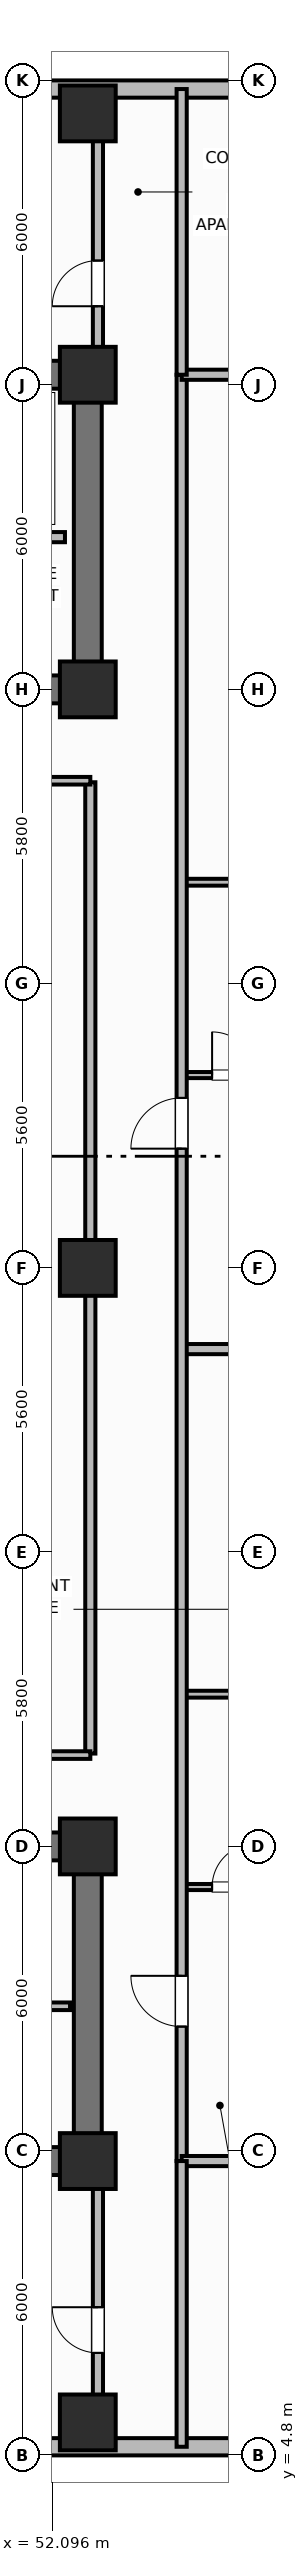
"""IFC4 building model, lengths in metres.
Left out: names, types, materials, properties, quantities, classifications, styles, units other than length and angle.
Written with IfcOpenShell. Run it as: python <this file> out.ifc"""

import sys

from ifc_helpers import new_model, si_unit, direction, frame, frame_2d, origin, origin_2d, place, context, subcontext, project, spatial, rectangle, extrude, element, fill, save


model = new_model("IFC4")
c1 = context("Model", 3, precision=1e-05, world=origin(), true_north=direction((0.0, 1.0)))
c2 = subcontext(c1, "Body", "Model", "MODEL_VIEW")
j1 = project(units=[si_unit("LENGTHUNIT", "METRE"), si_unit("PLANEANGLEUNIT", "RADIAN")], contexts=[c1])
p1 = place(None, origin())
s1 = spatial("IfcSite", under=j1, at=p1, CompositionType="ELEMENT")
p2 = place(p1, origin())
s2 = spatial("IfcBuilding", under=s1, at=p2, CompositionType="ELEMENT")
p3 = place(p2, frame((0.0, 0.0, 103.1)))
s3 = spatial("IfcBuildingStorey", under=s2, at=p3, CompositionType="ELEMENT", Elevation=103.1)
p4 = place(p3, frame((52.8, 10.6, 0.0), z_axis=(0.0, 0.0, 1.0), x_axis=(-1.0, 0.0, 0.0)))
e1 = element("IfcWall", 1, at=p4, inside=s3, PredefinedType="SHEAR", context=c2, shape_type="SweptSolid", body=[
    extrude(rectangle(XDim=27.2, YDim=0.55, at=frame_2d((13.6, 0.0))), origin(), (0.0, 0.0, 1.0), 3.7),
])
p5 = place(p3, frame((52.8, 10.875, 0.0), z_axis=(0.0, 0.0, 1.0), x_axis=(0.0, 1.0, 0.0)))
e2 = element("IfcWall", 2, at=p5, inside=s3, PredefinedType="SHEAR", context=c2, shape_type="SweptSolid", body=[
    extrude(rectangle(XDim=5.65, YDim=0.55, at=frame_2d((2.825, 0.0))), origin(), (0.0, 0.0, 1.0), 3.7),
])
p6 = place(p3, frame((25.6, 16.8, 0.0), z_axis=(0.0, 0.0, 1.0), x_axis=(1.0, 0.0, 0.0)))
e3 = element("IfcWall", 3, at=p6, inside=s3, PredefinedType="SHEAR", context=c2, shape_type="SweptSolid", body=[
    extrude(rectangle(XDim=27.2, YDim=0.55, at=frame_2d((13.6, 0.0))), origin(), (0.0, 0.0, 1.0), 3.7),
])
p7 = place(p6, frame((1.7, 0.0, 0.0)))
e4 = element("IfcOpeningElement", 4, at=p7, cuts=e3, PredefinedType="OPENING", context=c2, shape_type="SweptSolid", body=[
    extrude(rectangle(XDim=1.1, YDim=2.15, at=frame_2d((0.55, 1.075))), frame((0.0, 0.285, 0.0), z_axis=(0.0, -1.0, 0.0), x_axis=(1.0, 0.0, 0.0)), (0.0, 0.0, 1.0), 0.57),
])
p8 = place(p6, frame((4.45, 0.0, 0.0)))
e5 = element("IfcOpeningElement", 5, at=p8, cuts=e3, PredefinedType="OPENING", context=c2, shape_type="SweptSolid", body=[
    extrude(rectangle(XDim=0.85, YDim=2.1, at=frame_2d((0.425, 1.05))), frame((0.0, 0.285, 0.0), z_axis=(0.0, -1.0, 0.0), x_axis=(1.0, 0.0, 0.0)), (0.0, 0.0, 1.0), 0.57),
])
p9 = place(p6, frame((6.5, 0.0, 0.0)))
e6 = element("IfcOpeningElement", 6, at=p9, cuts=e3, PredefinedType="OPENING", context=c2, shape_type="SweptSolid", body=[
    extrude(rectangle(XDim=0.85, YDim=2.1, at=frame_2d((0.425, 1.05))), frame((0.0, 0.285, 0.0), z_axis=(0.0, -1.0, 0.0), x_axis=(1.0, 0.0, 0.0)), (0.0, 0.0, 1.0), 0.57),
])
p10 = place(p6, frame((13.0, 0.0, 0.0)))
e7 = element("IfcOpeningElement", 7, at=p10, cuts=e3, PredefinedType="OPENING", context=c2, shape_type="SweptSolid", body=[
    extrude(rectangle(XDim=1.2, YDim=2.15, at=frame_2d((0.6, 1.075))), frame((0.0, 0.285, 0.0), z_axis=(0.0, -1.0, 0.0), x_axis=(1.0, 0.0, 0.0)), (0.0, 0.0, 1.0), 0.57),
])
p11 = place(p6, frame((19.8, 0.0, 0.0)))
e8 = element("IfcOpeningElement", 8, at=p11, cuts=e3, PredefinedType="OPENING", context=c2, shape_type="SweptSolid", body=[
    extrude(rectangle(XDim=0.85, YDim=2.1, at=frame_2d((0.425, 1.05))), frame((0.0, 0.285, 0.0), z_axis=(0.0, -1.0, 0.0), x_axis=(1.0, 0.0, 0.0)), (0.0, 0.0, 1.0), 0.57),
])
p12 = place(p6, frame((24.2, 0.0, 0.0)))
e9 = element("IfcOpeningElement", 9, at=p12, cuts=e3, PredefinedType="OPENING", context=c2, shape_type="SweptSolid", body=[
    extrude(rectangle(XDim=0.85, YDim=2.1, at=frame_2d((0.425, 1.05))), frame((0.0, 0.285, 0.0), z_axis=(0.0, -1.0, 0.0), x_axis=(1.0, 0.0, 0.0)), (0.0, 0.0, 1.0), 0.57),
])
p13 = place(p3, frame((25.6, 45.8, 0.0), z_axis=(0.0, 0.0, 1.0), x_axis=(1.0, 0.0, 0.0)))
e10 = element("IfcWall", 10, at=p13, inside=s3, PredefinedType="SHEAR", context=c2, shape_type="SweptSolid", body=[
    extrude(rectangle(XDim=27.2, YDim=0.55, at=frame_2d((13.6, 0.0))), origin(), (0.0, 0.0, 1.0), 3.7),
])
p14 = place(p3, frame((52.8, 39.875, 0.0), z_axis=(0.0, 0.0, 1.0), x_axis=(0.0, 1.0, 0.0)))
e11 = element("IfcWall", 11, at=p14, inside=s3, PredefinedType="SHEAR", context=c2, shape_type="SweptSolid", body=[
    extrude(rectangle(XDim=5.65, YDim=0.55, at=frame_2d((2.825, 0.0))), origin(), (0.0, 0.0, 1.0), 3.7),
])
p15 = place(p3, frame((52.8, 39.6, 0.0), z_axis=(0.0, 0.0, 1.0), x_axis=(-1.0, 0.0, 0.0)))
e12 = element("IfcWall", 12, at=p15, inside=s3, PredefinedType="SHEAR", context=c2, shape_type="SweptSolid", body=[
    extrude(rectangle(XDim=27.2, YDim=0.55, at=frame_2d((13.6, 0.0))), origin(), (0.0, 0.0, 1.0), 3.7),
])
p16 = place(p15, frame((24.3, 0.0, 0.0)))
e13 = element("IfcOpeningElement", 13, at=p16, cuts=e12, PredefinedType="OPENING", context=c2, shape_type="SweptSolid", body=[
    extrude(rectangle(XDim=1.1, YDim=2.15, at=frame_2d((0.55, 1.075))), frame((0.0, 0.285, 0.0), z_axis=(0.0, -1.0, 0.0), x_axis=(1.0, 0.0, 0.0)), (0.0, 0.0, 1.0), 0.57),
])
p17 = place(p15, frame((21.85, 0.0, 0.0)))
e14 = element("IfcOpeningElement", 14, at=p17, cuts=e12, PredefinedType="OPENING", context=c2, shape_type="SweptSolid", body=[
    extrude(rectangle(XDim=0.85, YDim=2.1, at=frame_2d((0.425, 1.05))), frame((0.0, 0.285, 0.0), z_axis=(0.0, -1.0, 0.0), x_axis=(1.0, 0.0, 0.0)), (0.0, 0.0, 1.0), 0.57),
])
p18 = place(p15, frame((19.85, 0.0, 0.0)))
e15 = element("IfcOpeningElement", 15, at=p18, cuts=e12, PredefinedType="OPENING", context=c2, shape_type="SweptSolid", body=[
    extrude(rectangle(XDim=0.85, YDim=2.1, at=frame_2d((0.425, 1.05))), frame((0.0, 0.285, 0.0), z_axis=(0.0, -1.0, 0.0), x_axis=(1.0, 0.0, 0.0)), (0.0, 0.0, 1.0), 0.57),
])
p19 = place(p15, frame((15.1, 0.0, 0.0)))
e16 = element("IfcOpeningElement", 16, at=p19, cuts=e12, PredefinedType="OPENING", context=c2, shape_type="SweptSolid", body=[
    extrude(rectangle(XDim=1.2, YDim=2.15, at=frame_2d((0.6, 1.075))), frame((0.0, 0.285, 0.0), z_axis=(0.0, -1.0, 0.0), x_axis=(1.0, 0.0, 0.0)), (0.0, 0.0, 1.0), 0.57),
])
p20 = place(p15, frame((11.3, 0.0, 0.0)))
e17 = element("IfcOpeningElement", 17, at=p20, cuts=e12, PredefinedType="OPENING", context=c2, shape_type="SweptSolid", body=[
    extrude(rectangle(XDim=1.3, YDim=2.2, at=frame_2d((0.65, 1.1))), frame((0.0, 0.285, 0.0), z_axis=(0.0, -1.0, 0.0), x_axis=(1.0, 0.0, 0.0)), (0.0, 0.0, 1.0), 0.57),
])
p21 = place(p15, frame((7.25, 0.0, 0.0)))
e18 = element("IfcOpeningElement", 18, at=p21, cuts=e12, PredefinedType="OPENING", context=c2, shape_type="SweptSolid", body=[
    extrude(rectangle(XDim=0.85, YDim=2.1, at=frame_2d((0.425, 1.05))), frame((0.0, 0.285, 0.0), z_axis=(0.0, -1.0, 0.0), x_axis=(1.0, 0.0, 0.0)), (0.0, 0.0, 1.0), 0.57),
])
p22 = place(p15, frame((4.6, 0.0, 0.0)))
e19 = element("IfcOpeningElement", 19, at=p22, cuts=e12, PredefinedType="OPENING", context=c2, shape_type="SweptSolid", body=[
    extrude(rectangle(XDim=0.85, YDim=2.1, at=frame_2d((0.425, 1.05))), frame((0.0, 0.285, 0.0), z_axis=(0.0, -1.0, 0.0), x_axis=(1.0, 0.0, 0.0)), (0.0, 0.0, 1.0), 0.57),
])
p23 = place(p15, frame((1.9, 0.0, 0.0)))
e20 = element("IfcOpeningElement", 20, at=p23, cuts=e12, PredefinedType="OPENING", context=c2, shape_type="SweptSolid", body=[
    extrude(rectangle(XDim=0.85, YDim=2.1, at=frame_2d((0.425, 1.05))), frame((0.0, 0.285, 0.0), z_axis=(0.0, -1.0, 0.0), x_axis=(1.0, 0.0, 0.0)), (0.0, 0.0, 1.0), 0.57),
])
for number, where, z_axis, x_axis in (
    (21, (52.8, 10.6, 0.0), (0.0, 0.0, 1.0), (1.0, 0.0, 0.0)),
    (22, (52.8, 16.8, 0.0), (0.0, 0.0, 1.0), (1.0, 0.0, 0.0)),
    (23, (52.8, 39.6, 0.0), (0.0, 0.0, 1.0), (1.0, 0.0, 0.0)),
    (24, (52.8, 45.8, 0.0), (0.0, 0.0, 1.0), (1.0, 0.0, 0.0)),
    (25, (52.8, 28.2, 0.0), (0.0, 0.0, 1.0), (1.0, 0.0, 0.0)),
    (26, (52.8, 5.45, 0.0), (0.0, 0.0, 1.0), (1.0, 0.0, 0.0)),
    (27, (52.8, 50.95, 0.0), (0.0, 0.0, 1.0), (1.0, 0.0, 0.0)),
):
    element("IfcColumn", number, at=place(p3, frame(where, z_axis=z_axis, x_axis=x_axis)), inside=s3, PredefinedType="COLUMN", context=c2, shape_type="SweptSolid", body=[
        extrude(rectangle(XDim=1.1, YDim=1.1, at=origin_2d()), origin(), (0.0, 0.0, 1.0), 3.7),
    ])
p24 = place(p3, frame((42.4, 4.97, 0.0), z_axis=(0.0, 0.0, 1.0), x_axis=(1.0, 0.0, 0.0)))
e28 = element("IfcWall", 28, at=p24, inside=s3, PredefinedType="SOLIDWALL", context=c2, shape_type="SweptSolid", body=[
    extrude(rectangle(XDim=17.4, YDim=0.34, at=frame_2d((8.7, 0.0))), origin(), (0.0, 0.0, 1.0), 2.7),
])
p25 = place(p24, frame((5.788, 0.0, 0.73)))
e29 = element("IfcOpeningElement", 29, at=p25, cuts=e28, PredefinedType="OPENING", context=c2, shape_type="SweptSolid", body=[
    extrude(rectangle(XDim=1.8, YDim=1.85, at=frame_2d((0.9, 0.925))), frame((0.0, 0.18, 0.0), z_axis=(0.0, -1.0, 0.0), x_axis=(1.0, 0.0, 0.0)), (0.0, 0.0, 1.0), 0.36),
])
p26 = place(p24, frame((13.837, 0.0, 0.73)))
e30 = element("IfcOpeningElement", 30, at=p26, cuts=e28, PredefinedType="OPENING", context=c2, shape_type="SweptSolid", body=[
    extrude(rectangle(XDim=1.8, YDim=1.85, at=frame_2d((0.9, 0.925))), frame((0.0, 0.18, 0.0), z_axis=(0.0, -1.0, 0.0), x_axis=(1.0, 0.0, 0.0)), (0.0, 0.0, 1.0), 0.36),
])
p27 = place(p3, frame((59.8, 51.43, 0.0), z_axis=(0.0, 0.0, 1.0), x_axis=(-1.0, 0.0, 0.0)))
e31 = element("IfcWall", 31, at=p27, inside=s3, PredefinedType="SOLIDWALL", context=c2, shape_type="SweptSolid", body=[
    extrude(rectangle(XDim=17.4, YDim=0.34, at=frame_2d((8.7, 0.0))), origin(), (0.0, 0.0, 1.0), 2.7),
])
p28 = place(p27, frame((1.71, 0.0, 0.93)))
e32 = element("IfcOpeningElement", 32, at=p28, cuts=e31, PredefinedType="OPENING", context=c2, shape_type="SweptSolid", body=[
    extrude(rectangle(XDim=1.1, YDim=1.65, at=frame_2d((0.55, 0.825))), frame((0.0, 0.18, 0.0), z_axis=(0.0, -1.0, 0.0), x_axis=(1.0, 0.0, 0.0)), (0.0, 0.0, 1.0), 0.36),
])
p29 = place(p27, frame((8.5, 0.0, 0.93)))
e33 = element("IfcOpeningElement", 33, at=p29, cuts=e31, PredefinedType="OPENING", context=c2, shape_type="SweptSolid", body=[
    extrude(rectangle(XDim=1.1, YDim=1.65, at=frame_2d((0.55, 0.825))), frame((0.0, 0.18, 0.0), z_axis=(0.0, -1.0, 0.0), x_axis=(1.0, 0.0, 0.0)), (0.0, 0.0, 1.0), 0.36),
])
p30 = place(p27, frame((11.37, 0.0, 0.93)))
e34 = element("IfcOpeningElement", 34, at=p30, cuts=e31, PredefinedType="OPENING", context=c2, shape_type="SweptSolid", body=[
    extrude(rectangle(XDim=1.1, YDim=1.65, at=frame_2d((0.55, 0.825))), frame((0.0, 0.18, 0.0), z_axis=(0.0, -1.0, 0.0), x_axis=(1.0, 0.0, 0.0)), (0.0, 0.0, 1.0), 0.36),
])
p31 = place(p3, frame((48.05, 13.65, 0.0), z_axis=(0.0, 0.0, 1.0), x_axis=(1.0, 0.0, 0.0)))
e35 = element("IfcWall", 35, at=p31, inside=s3, PredefinedType="PARTITIONING", context=c2, shape_type="SweptSolid", body=[
    extrude(rectangle(XDim=4.4, YDim=0.15, at=frame_2d((2.2, 0.0))), origin(), (0.0, 0.0, 1.0), 2.53),
])
p32 = place(p31, frame((1.6, 0.0, 0.0)))
e36 = element("IfcOpeningElement", 36, at=p32, cuts=e35, PredefinedType="OPENING", context=c2, shape_type="SweptSolid", body=[
    extrude(rectangle(XDim=0.85, YDim=2.1, at=frame_2d((0.425, 1.05))), frame((0.0, 0.085, 0.0), z_axis=(0.0, -1.0, 0.0), x_axis=(1.0, 0.0, 0.0)), (0.0, 0.0, 1.0), 0.17),
])
p33 = place(p3, frame((52.35, 42.6, 0.0), z_axis=(0.0, 0.0, 1.0), x_axis=(-1.0, 0.0, 0.0)))
e37 = element("IfcWall", 37, at=p33, inside=s3, PredefinedType="PARTITIONING", context=c2, shape_type="SweptSolid", body=[
    extrude(rectangle(XDim=8.8, YDim=0.2, at=frame_2d((4.4, 0.0))), origin(), (0.0, 0.0, 1.0), 2.53),
])
p34 = place(p33, frame((7.1, 0.0, 0.0)))
e38 = element("IfcOpeningElement", 38, at=p34, cuts=e37, PredefinedType="OPENING", context=c2, shape_type="SweptSolid", body=[
    extrude(rectangle(XDim=1.0, YDim=2.15, at=frame_2d((0.5, 1.075))), frame((0.0, 0.11, 0.0), z_axis=(0.0, -1.0, 0.0), x_axis=(1.0, 0.0, 0.0)), (0.0, 0.0, 1.0), 0.22),
])
p35 = place(p3, frame((52.85, 18.63, 0.0), z_axis=(0.0, 0.0, 1.0), x_axis=(0.0, 1.0, 0.0)))
e39 = element("IfcWall", 39, at=p35, inside=s3, PredefinedType="PARTITIONING", context=c2, shape_type="SweptSolid", body=[
    extrude(rectangle(XDim=19.14, YDim=0.2, at=frame_2d((9.57, 0.0))), origin(), (0.0, 0.0, 1.0), 2.53),
])
for number, where, z_axis, x_axis in (
    (40, (46.35, 18.6, 0.0), (0.0, 0.0, 1.0), (1.0, 0.0, 0.0)),
    (41, (46.35, 37.8, 0.0), (0.0, 0.0, 1.0), (1.0, 0.0, 0.0)),
):
    element("IfcWall", number, at=place(p3, frame(where, z_axis=z_axis, x_axis=x_axis)), inside=s3, PredefinedType="PARTITIONING", context=c2, shape_type="SweptSolid", body=[
        extrude(rectangle(XDim=6.5, YDim=0.15, at=frame_2d((3.25, 0.0))), origin(), (0.0, 0.0, 1.0), 2.53),
    ])
p36 = place(p3, frame((54.65, 16.0, 0.0), z_axis=(0.0, 0.0, 1.0), x_axis=(1.0, 0.0, 0.0)))
e42 = element("IfcWall", 42, at=p36, inside=s3, PredefinedType="PARTITIONING", context=c2, shape_type="SweptSolid", body=[
    extrude(rectangle(XDim=2.25, YDim=0.12, at=frame_2d((1.125, 0.0))), origin(), (0.0, 0.0, 1.0), 2.53),
])
p37 = place(p36, frame((0.6, 0.0, 0.0)))
e43 = element("IfcOpeningElement", 43, at=p37, cuts=e42, PredefinedType="OPENING", context=c2, shape_type="SweptSolid", body=[
    extrude(rectangle(XDim=0.85, YDim=2.1, at=frame_2d((0.425, 1.05))), frame((0.0, 0.07, 0.0), z_axis=(0.0, -1.0, 0.0), x_axis=(1.0, 0.0, 0.0)), (0.0, 0.0, 1.0), 0.14),
])
p38 = place(p3, frame((54.65, 19.8, 0.0), z_axis=(0.0, 0.0, 1.0), x_axis=(1.0, 0.0, 0.0)))
e44 = element("IfcWall", 44, at=p38, inside=s3, PredefinedType="PARTITIONING", context=c2, shape_type="SweptSolid", body=[
    extrude(rectangle(XDim=2.25, YDim=0.135, at=frame_2d((1.125, 0.0))), origin(), (0.0, 0.0, 1.0), 2.53),
])
p39 = place(p3, frame((54.65, 26.6, 0.0), z_axis=(0.0, 0.0, 1.0), x_axis=(1.0, 0.0, 0.0)))
e45 = element("IfcWall", 45, at=p39, inside=s3, PredefinedType="PARTITIONING", context=c2, shape_type="SweptSolid", body=[
    extrude(rectangle(XDim=8.637, YDim=0.2, at=frame_2d((4.319, 0.0))), origin(), (0.0, 0.0, 1.0), 2.53),
])
p40 = place(p3, frame((54.65, 32.0, 0.0), z_axis=(0.0, 0.0, 1.0), x_axis=(1.0, 0.0, 0.0)))
e46 = element("IfcWall", 46, at=p40, inside=s3, PredefinedType="PARTITIONING", context=c2, shape_type="SweptSolid", body=[
    extrude(rectangle(XDim=2.25, YDim=0.12, at=frame_2d((1.125, 0.0))), origin(), (0.0, 0.0, 1.0), 2.53),
])
p41 = place(p40, frame((0.6, 0.0, 0.0)))
e47 = element("IfcOpeningElement", 47, at=p41, cuts=e46, PredefinedType="OPENING", context=c2, shape_type="SweptSolid", body=[
    extrude(rectangle(XDim=0.85, YDim=2.1, at=frame_2d((0.425, 1.05))), frame((0.0, 0.07, 0.0), z_axis=(0.0, -1.0, 0.0), x_axis=(1.0, 0.0, 0.0)), (0.0, 0.0, 1.0), 0.14),
])
p42 = place(p3, frame((54.65, 35.8, 0.0), z_axis=(0.0, 0.0, 1.0), x_axis=(1.0, 0.0, 0.0)))
e48 = element("IfcWall", 48, at=p42, inside=s3, PredefinedType="PARTITIONING", context=c2, shape_type="SweptSolid", body=[
    extrude(rectangle(XDim=2.25, YDim=0.135, at=frame_2d((1.125, 0.0))), origin(), (0.0, 0.0, 1.0), 2.53),
])
p43 = place(p3, frame((54.65, 10.6, 0.0), z_axis=(0.0, 0.0, 1.0), x_axis=(0.0, 1.0, 0.0)))
e49 = element("IfcWall", 49, at=p43, inside=s3, PredefinedType="PARTITIONING", context=c2, shape_type="SweptSolid", body=[
    extrude(rectangle(XDim=35.2, YDim=0.2, at=frame_2d((17.6, 0.0))), origin(), (0.0, 0.0, 1.0), 2.53),
])
p44 = place(p43, frame((2.65, 0.0, 0.0)))
e50 = element("IfcOpeningElement", 50, at=p44, cuts=e49, PredefinedType="OPENING", context=c2, shape_type="SweptSolid", body=[
    extrude(rectangle(XDim=1.0, YDim=2.15, at=frame_2d((0.5, 1.075))), frame((0.0, 0.11, 0.0), z_axis=(0.0, -1.0, 0.0), x_axis=(1.0, 0.0, 0.0)), (0.0, 0.0, 1.0), 0.22),
])
p45 = place(p43, frame((19.95, 0.0, 0.0)))
e51 = element("IfcOpeningElement", 51, at=p45, cuts=e49, PredefinedType="OPENING", context=c2, shape_type="SweptSolid", body=[
    extrude(rectangle(XDim=1.0, YDim=2.15, at=frame_2d((0.5, 1.075))), frame((0.0, 0.11, 0.0), z_axis=(0.0, -1.0, 0.0), x_axis=(1.0, 0.0, 0.0)), (0.0, 0.0, 1.0), 0.22),
])
for number, where, z_axis, x_axis in (
    (52, (54.65, 10.6, 0.0), (0.0, 0.0, 1.0), (1.0, 0.0, 0.0)),
    (53, (54.65, 45.8, 0.0), (0.0, 0.0, 1.0), (1.0, 0.0, 0.0)),
):
    element("IfcWall", number, at=place(p3, frame(where, z_axis=z_axis, x_axis=x_axis)), inside=s3, PredefinedType="PARTITIONING", context=c2, shape_type="SweptSolid", body=[
        extrude(rectangle(XDim=8.76, YDim=0.2, at=frame_2d((4.38, 0.0))), origin(), (0.0, 0.0, 1.0), 2.53),
    ])
p46 = place(p3, frame((54.65, 4.97, 0.0), z_axis=(0.0, 0.0, 1.0), x_axis=(0.0, 1.0, 0.0)))
e54 = element("IfcWall", 54, at=p46, inside=s3, PredefinedType="PARTITIONING", context=c2, shape_type="SweptSolid", body=[
    extrude(rectangle(XDim=5.63, YDim=0.2, at=frame_2d((2.815, 0.0))), origin(), (0.0, 0.0, 1.0), 2.53),
])
p47 = place(p3, frame((54.65, 45.8, 0.0), z_axis=(0.0, 0.0, 1.0), x_axis=(0.0, 1.0, 0.0)))
e55 = element("IfcWall", 55, at=p47, inside=s3, PredefinedType="PARTITIONING", context=c2, shape_type="SweptSolid", body=[
    extrude(rectangle(XDim=5.63, YDim=0.2, at=frame_2d((2.815, 0.0))), origin(), (0.0, 0.0, 1.0), 2.53),
])
p48 = place(p3, frame((53.0, 5.97, 0.0), z_axis=(0.0, 0.0, 1.0), x_axis=(0.0, 1.0, 0.0)))
e56 = element("IfcWall", 56, at=p48, inside=s3, PredefinedType="PARTITIONING", context=c2, shape_type="SweptSolid", body=[
    extrude(rectangle(XDim=4.33, YDim=0.2, at=frame_2d((2.165, 0.0))), origin(), (0.0, 0.0, 1.0), 2.53),
])
p49 = place(p48, frame((0.85, 0.0, 0.0)))
e57 = element("IfcOpeningElement", 57, at=p49, cuts=e56, PredefinedType="OPENING", context=c2, shape_type="SweptSolid", body=[
    extrude(rectangle(XDim=0.9, YDim=2.1, at=frame_2d((0.45, 1.05))), frame((0.0, 0.11, 0.0), z_axis=(0.0, -1.0, 0.0), x_axis=(1.0, 0.0, 0.0)), (0.0, 0.0, 1.0), 0.22),
])
p50 = place(p3, frame((53.0, 46.1, 0.0), z_axis=(0.0, 0.0, 1.0), x_axis=(0.0, 1.0, 0.0)))
e58 = element("IfcWall", 58, at=p50, inside=s3, PredefinedType="PARTITIONING", context=c2, shape_type="SweptSolid", body=[
    extrude(rectangle(XDim=4.33, YDim=0.2, at=frame_2d((2.165, 0.0))), origin(), (0.0, 0.0, 1.0), 2.53),
])
p51 = place(p50, frame((1.05, 0.0, 0.0)))
e59 = element("IfcOpeningElement", 59, at=p51, cuts=e58, PredefinedType="OPENING", context=c2, shape_type="SweptSolid", body=[
    extrude(rectangle(XDim=0.9, YDim=2.1, at=frame_2d((0.45, 1.05))), frame((0.0, 0.11, 0.0), z_axis=(0.0, -1.0, 0.0), x_axis=(1.0, 0.0, 0.0)), (0.0, 0.0, 1.0), 0.22),
])
p52 = place(p37, origin())
e60 = element("IfcDoor", 60, at=p52, inside=s3, OperationType="SINGLE_SWING_RIGHT", PredefinedType="DOOR", context=c2, shape_type="SweptSolid", body=[
    extrude(rectangle(XDim=0.85, YDim=2.1, at=frame_2d((0.425, 1.05))), frame((0.0, 0.025, 0.0), z_axis=(0.0, -1.0, 0.0), x_axis=(1.0, 0.0, 0.0)), (0.0, 0.0, 1.0), 0.05),
])
fill(e43, e60)
p53 = place(p41, origin())
e61 = element("IfcDoor", 61, at=p53, inside=s3, OperationType="SINGLE_SWING_LEFT", PredefinedType="DOOR", context=c2, shape_type="SweptSolid", body=[
    extrude(rectangle(XDim=0.85, YDim=2.1, at=frame_2d((0.425, 1.05))), frame((0.0, 0.025, 0.0), z_axis=(0.0, -1.0, 0.0), x_axis=(1.0, 0.0, 0.0)), (0.0, 0.0, 1.0), 0.05),
])
fill(e47, e61)
p54 = place(p44, origin())
e62 = element("IfcDoor", 62, at=p54, inside=s3, OperationType="SINGLE_SWING_RIGHT", PredefinedType="DOOR", context=c2, shape_type="SweptSolid", body=[
    extrude(rectangle(XDim=1.0, YDim=2.15, at=frame_2d((0.5, 1.075))), frame((0.0, 0.025, 0.0), z_axis=(0.0, -1.0, 0.0), x_axis=(1.0, 0.0, 0.0)), (0.0, 0.0, 1.0), 0.05),
])
fill(e50, e62)
p55 = place(p45, origin())
e63 = element("IfcDoor", 63, at=p55, inside=s3, OperationType="SINGLE_SWING_LEFT", PredefinedType="DOOR", context=c2, shape_type="SweptSolid", body=[
    extrude(rectangle(XDim=1.0, YDim=2.15, at=frame_2d((0.5, 1.075))), frame((0.0, 0.025, 0.0), z_axis=(0.0, -1.0, 0.0), x_axis=(1.0, 0.0, 0.0)), (0.0, 0.0, 1.0), 0.05),
])
fill(e51, e63)
p56 = place(p49, origin())
e64 = element("IfcDoor", 64, at=p56, inside=s3, OperationType="SINGLE_SWING_RIGHT", PredefinedType="DOOR", context=c2, shape_type="SweptSolid", body=[
    extrude(rectangle(XDim=0.9, YDim=2.1, at=frame_2d((0.45, 1.05))), frame((0.0, 0.025, 0.0), z_axis=(0.0, -1.0, 0.0), x_axis=(1.0, 0.0, 0.0)), (0.0, 0.0, 1.0), 0.05),
])
fill(e57, e64)
p57 = place(p51, origin())
e65 = element("IfcDoor", 65, at=p57, inside=s3, OperationType="SINGLE_SWING_LEFT", PredefinedType="DOOR", context=c2, shape_type="SweptSolid", body=[
    extrude(rectangle(XDim=0.9, YDim=2.1, at=frame_2d((0.45, 1.05))), frame((0.0, 0.025, 0.0), z_axis=(0.0, -1.0, 0.0), x_axis=(1.0, 0.0, 0.0)), (0.0, 0.0, 1.0), 0.05),
])
fill(e59, e65)
save(model, sys.argv[1])
